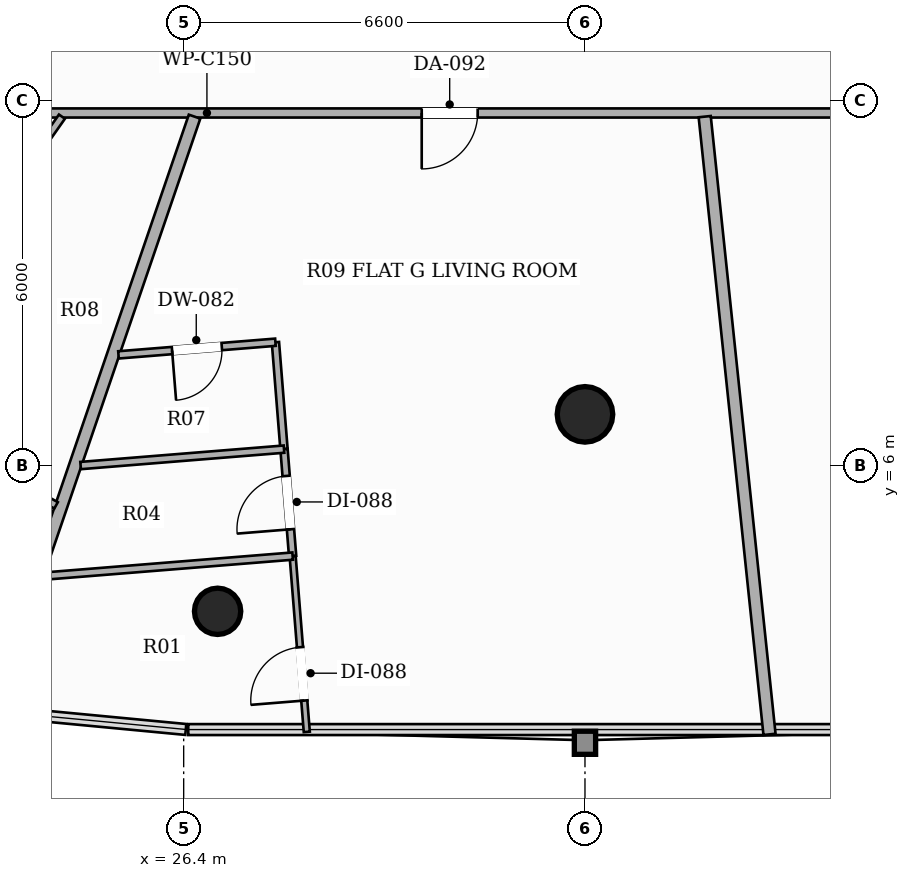
"""IFC4 building model, lengths in metres.
Left out: names, types, materials, properties, quantities, classifications, styles, units other than length and angle.
Written with IfcOpenShell. Run it as: python <this file> out.ifc"""

import sys

from ifc_helpers import new_model, si_unit, direction, frame, frame_2d, origin, origin_2d, place, context, subcontext, project, spatial, rectangle, hollow_circle, extrude, element, fill, save


model = new_model("IFC4")
c1 = context("Model", 3, precision=1e-05, world=origin(), true_north=direction((0.0, 1.0)))
c2 = subcontext(c1, "Body", "Model", "MODEL_VIEW")
j1 = project(units=[si_unit("LENGTHUNIT", "METRE"), si_unit("PLANEANGLEUNIT", "RADIAN")], contexts=[c1])
p1 = place(None, origin())
s1 = spatial("IfcSite", under=j1, at=p1, CompositionType="ELEMENT")
p2 = place(p1, origin())
s2 = spatial("IfcBuilding", under=s1, at=p2, CompositionType="ELEMENT")
p3 = place(p2, frame((0.0, 0.0, 53.3)))
s3 = spatial("IfcBuildingStorey", under=s2, at=p3, CompositionType="ELEMENT", Elevation=53.3)
p4 = place(p3, frame((33.0, 6.844, 0.0), z_axis=(0.0, 0.0, 1.0), x_axis=(1.0, 0.0, 0.0)))
e1 = element("IfcColumn", 1, at=p4, inside=s3, PredefinedType="COLUMN", context=c2, shape_type="SweptSolid", body=[
    extrude(hollow_circle(Radius=0.457, WallThickness=0.025, at=origin_2d()), origin(), (0.0, 0.0, 1.0), 3.3),
])
p5 = place(p3, frame((26.958, 3.605, 0.0), z_axis=(0.0, 0.0, 1.0), x_axis=(1.0, 0.0, 0.0)))
e2 = element("IfcColumn", 2, at=p5, inside=s3, PredefinedType="COLUMN", context=c2, shape_type="SweptSolid", body=[
    extrude(hollow_circle(Radius=0.381, WallThickness=0.022, at=origin_2d()), origin(), (0.0, 0.0, 1.0), 3.3),
])
p6 = place(p3, frame((42.59, 11.8, 0.0), z_axis=(0.0, 0.0, 1.0), x_axis=(-1.0, 0.0, 0.0)))
e3 = element("IfcWall", 3, at=p6, inside=s3, PredefinedType="PARTITIONING", context=c2, shape_type="SweptSolid", body=[
    extrude(rectangle(XDim=19.24, YDim=0.15, at=frame_2d((9.62, 0.0))), origin(), (0.0, 0.0, 1.0), 2.669),
])
p7 = place(p6, frame((11.355, 0.0, 0.0)))
e4 = element("IfcOpeningElement", 4, at=p7, cuts=e3, PredefinedType="OPENING", context=c2, shape_type="SweptSolid", body=[
    extrude(rectangle(XDim=0.92, YDim=2.15, at=frame_2d((0.46, 1.075))), frame((0.0, 0.085, 0.0), z_axis=(0.0, -1.0, 0.0), x_axis=(1.0, 0.0, 0.0)), (0.0, 0.0, 1.0), 0.17),
])
p8 = place(p6, frame((3.524, 0.0, 0.0)))
e5 = element("IfcOpeningElement", 5, at=p8, cuts=e3, PredefinedType="OPENING", context=c2, shape_type="SweptSolid", body=[
    extrude(rectangle(XDim=0.88, YDim=2.1, at=frame_2d((0.44, 1.05))), frame((0.0, 0.085, 0.0), z_axis=(0.0, -1.0, 0.0), x_axis=(1.0, 0.0, 0.0)), (0.0, 0.0, 1.0), 0.17),
])
p9 = place(p3, frame((26.579, 11.74, 0.0), z_axis=(0.0, 0.0, 1.0), x_axis=(-0.32385337678, -0.946107282684, 0.0)))
e6 = element("IfcWall", 6, at=p9, inside=s3, PredefinedType="PARTITIONING", context=c2, shape_type="SweptSolid", body=[
    extrude(rectangle(XDim=10.378, YDim=0.2, at=frame_2d((5.189, 0.0))), origin(), (0.0, 0.0, 1.0), 2.413),
])
p10 = place(p3, frame((34.969, 11.74, 0.0), z_axis=(0.0, 0.0, 1.0), x_axis=(0.10435134466, -0.994540495338, 0.0)))
e7 = element("IfcWall", 7, at=p10, inside=s3, PredefinedType="PARTITIONING", context=c2, shape_type="SweptSolid", body=[
    extrude(rectangle(XDim=10.215, YDim=0.2, at=frame_2d((5.107, 0.0))), origin(), (0.0, 0.0, 1.0), 2.413),
])
p11 = place(p3, frame((24.398, 11.74, 0.0), z_axis=(0.0, 0.0, 1.0), x_axis=(-0.575258030062, -0.817972003707, 0.0)))
e8 = element("IfcWall", 8, at=p11, inside=s3, PredefinedType="PARTITIONING", context=c2, shape_type="SweptSolid", body=[
    extrude(rectangle(XDim=5.653, YDim=0.12, at=frame_2d((2.827, 0.0))), origin(), (0.0, 0.0, 1.0), 2.413),
])
p12 = place(p11, frame((2.417, 0.0, 0.0)))
e9 = element("IfcOpeningElement", 9, at=p12, cuts=e8, PredefinedType="OPENING", context=c2, shape_type="SweptSolid", body=[
    extrude(rectangle(XDim=0.82, YDim=2.1, at=frame_2d((0.41, 1.05))), frame((0.0, 0.07, 0.0), z_axis=(0.0, -1.0, 0.0), x_axis=(1.0, 0.0, 0.0)), (0.0, 0.0, 1.0), 0.14),
])
p13 = place(p3, frame((24.301, 5.347, 0.0), z_axis=(0.0, 0.0, 1.0), x_axis=(-0.872243471816, 0.48907190256, 0.0)))
e10 = element("IfcWall", 10, at=p13, inside=s3, PredefinedType="PARTITIONING", context=c2, shape_type="SweptSolid", body=[
    extrude(rectangle(XDim=3.617, YDim=0.12, at=frame_2d((1.809, 0.0))), origin(), (0.0, 0.0, 1.0), 2.413),
])
p14 = place(p3, frame((28.05, 6.272, 0.0), z_axis=(0.0, 0.0, 1.0), x_axis=(-0.080009304194, 0.996794116778, 0.0)))
e11 = element("IfcWall", 11, at=p14, inside=s3, PredefinedType="PARTITIONING", context=c2, shape_type="SweptSolid", body=[
    extrude(rectangle(XDim=1.764, YDim=0.12, at=frame_2d((0.882, 0.0))), origin(), (0.0, 0.0, 1.0), 3.06),
])
p15 = place(p3, frame((27.909, 8.03, 0.0), z_axis=(0.0, 0.0, 1.0), x_axis=(-0.996768339954, -0.080329798112, 0.0)))
e12 = element("IfcWall", 12, at=p15, inside=s3, PredefinedType="PARTITIONING", context=c2, shape_type="SweptSolid", body=[
    extrude(rectangle(XDim=2.589, YDim=0.12, at=frame_2d((1.295, 0.0))), origin(), (0.0, 0.0, 1.0), 3.06),
])
p16 = place(p15, frame((0.885, 0.0, 0.0)))
e13 = element("IfcOpeningElement", 13, at=p16, cuts=e12, PredefinedType="OPENING", context=c2, shape_type="SweptSolid", body=[
    extrude(rectangle(XDim=0.82, YDim=2.1, at=frame_2d((0.41, 1.05))), frame((0.0, 0.07, 0.0), z_axis=(0.0, -1.0, 0.0), x_axis=(1.0, 0.0, 0.0)), (0.0, 0.0, 1.0), 0.14),
])
p17 = place(p3, frame((28.192, 4.513, 0.0), z_axis=(0.0, 0.0, 1.0), x_axis=(-0.080377539135, 0.996764491343, 0.0)))
e14 = element("IfcWall", 14, at=p17, inside=s3, PredefinedType="PARTITIONING", context=c2, shape_type="SweptSolid", body=[
    extrude(rectangle(XDim=1.765, YDim=0.12, at=frame_2d((0.882, 0.0))), origin(), (0.0, 0.0, 1.0), 2.413),
])
p18 = place(p17, frame((0.442, 0.0, 0.0)))
e15 = element("IfcOpeningElement", 15, at=p18, cuts=e14, PredefinedType="OPENING", context=c2, shape_type="SweptSolid", body=[
    extrude(rectangle(XDim=0.88, YDim=2.1, at=frame_2d((0.44, 1.05))), frame((0.0, 0.07, 0.0), z_axis=(0.0, -1.0, 0.0), x_axis=(1.0, 0.0, 0.0)), (0.0, 0.0, 1.0), 0.14),
])
p19 = place(p3, frame((28.425, 1.622, 0.0), z_axis=(0.0, 0.0, 1.0), x_axis=(-0.080390934681, 0.996763411057, 0.0)))
e16 = element("IfcWall", 16, at=p19, inside=s3, PredefinedType="PARTITIONING", context=c2, shape_type="SweptSolid", body=[
    extrude(rectangle(XDim=2.9, YDim=0.1, at=frame_2d((1.45, 0.0))), origin(), (0.0, 0.0, 1.0), 2.413),
])
p20 = place(p19, frame((0.517, 0.0, 0.0)))
e17 = element("IfcOpeningElement", 17, at=p20, cuts=e16, PredefinedType="OPENING", context=c2, shape_type="SweptSolid", body=[
    extrude(rectangle(XDim=0.88, YDim=2.1, at=frame_2d((0.44, 1.05))), frame((0.0, 0.06, 0.0), z_axis=(0.0, -1.0, 0.0), x_axis=(1.0, 0.0, 0.0)), (0.0, 0.0, 1.0), 0.12),
])
p21 = place(p3, frame((28.05, 6.272, 0.0), z_axis=(0.0, 0.0, 1.0), x_axis=(-0.99675765278, -0.080462299392, 0.0)))
e18 = element("IfcWall", 18, at=p21, inside=s3, PredefinedType="PARTITIONING", context=c2, shape_type="SweptSolid", body=[
    extrude(rectangle(XDim=3.356, YDim=0.12, at=frame_2d((1.678, 0.0))), origin(), (0.0, 0.0, 1.0), 2.413),
])
p22 = place(p3, frame((28.192, 4.513, 0.0), z_axis=(0.0, 0.0, 1.0), x_axis=(-0.996771449714, -0.080291201486, 0.0)))
e19 = element("IfcWall", 19, at=p22, inside=s3, PredefinedType="PARTITIONING", context=c2, shape_type="SweptSolid", body=[
    extrude(rectangle(XDim=4.123, YDim=0.12, at=frame_2d((2.062, 0.0))), origin(), (0.0, 0.0, 1.0), 2.413),
])
p23 = place(p7, origin())
e20 = element("IfcDoor", 20, at=p23, inside=s3, OperationType="SINGLE_SWING_RIGHT", PredefinedType="DOOR", context=c2, shape_type="SweptSolid", body=[
    extrude(rectangle(XDim=0.92, YDim=2.15, at=frame_2d((0.46, 1.075))), frame((0.0, 0.025, 0.0), z_axis=(0.0, -1.0, 0.0), x_axis=(1.0, 0.0, 0.0)), (0.0, 0.0, 1.0), 0.05),
])
fill(e4, e20)
p24 = place(p16, origin())
e21 = element("IfcDoor", 21, at=p24, inside=s3, OperationType="SINGLE_SWING_RIGHT", PredefinedType="DOOR", context=c2, shape_type="SweptSolid", body=[
    extrude(rectangle(XDim=0.82, YDim=2.1, at=frame_2d((0.41, 1.05))), frame((0.0, 0.025, 0.0), z_axis=(0.0, -1.0, 0.0), x_axis=(1.0, 0.0, 0.0)), (0.0, 0.0, 1.0), 0.05),
])
fill(e13, e21)
p25 = place(p18, origin())
e22 = element("IfcDoor", 22, at=p25, inside=s3, OperationType="SINGLE_SWING_LEFT", PredefinedType="DOOR", context=c2, shape_type="SweptSolid", body=[
    extrude(rectangle(XDim=0.88, YDim=2.1, at=frame_2d((0.44, 1.05))), frame((0.0, 0.025, 0.0), z_axis=(0.0, -1.0, 0.0), x_axis=(1.0, 0.0, 0.0)), (0.0, 0.0, 1.0), 0.05),
])
fill(e15, e22)
p26 = place(p20, origin())
e23 = element("IfcDoor", 23, at=p26, inside=s3, OperationType="SINGLE_SWING_LEFT", PredefinedType="DOOR", context=c2, shape_type="SweptSolid", body=[
    extrude(rectangle(XDim=0.88, YDim=2.1, at=frame_2d((0.44, 1.05))), frame((0.0, 0.025, 0.0), z_axis=(0.0, -1.0, 0.0), x_axis=(1.0, 0.0, 0.0)), (0.0, 0.0, 1.0), 0.05),
])
fill(e17, e23)
save(model, sys.argv[1])
